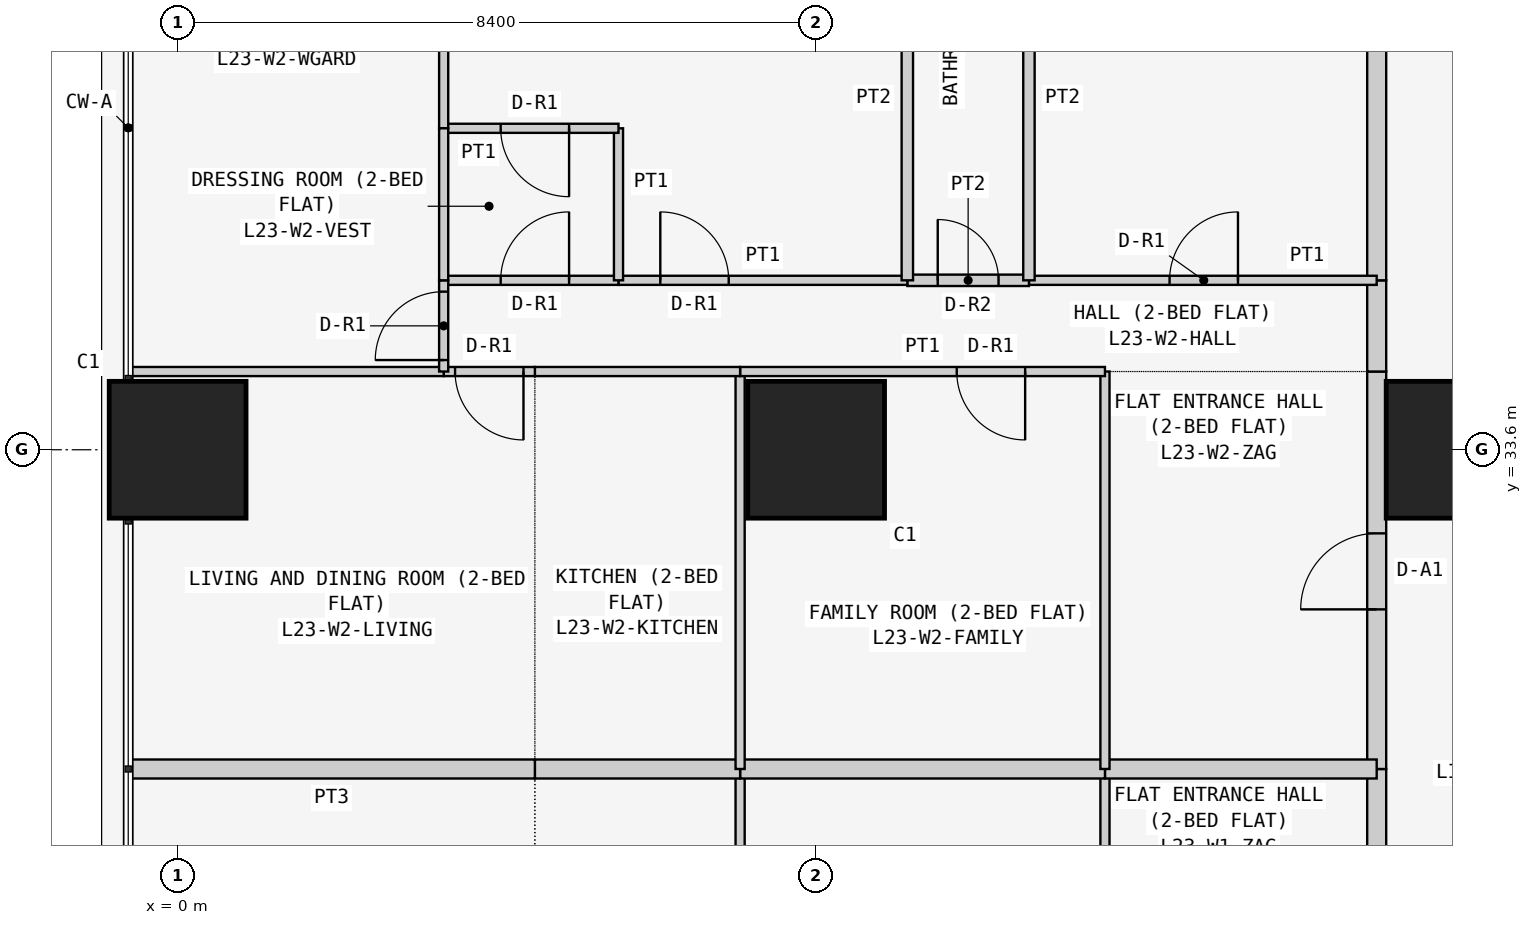
"""IFC4 building model, lengths in metres.
Left out: names, types, materials, properties, quantities, classifications, styles, units other than length and angle.
Written with IfcOpenShell. Run it as: python <this file> out.ifc"""

import sys

from ifc_helpers import new_model, si_unit, direction, frame, frame_2d, origin, origin_2d, place, context, subcontext, project, spatial, rectangle, extrude, element, fill, save


model = new_model("IFC4")
c1 = context("Model", 3, precision=1e-05, world=origin(), true_north=direction((0.0, 1.0)))
c2 = subcontext(c1, "Body", "Model", "MODEL_VIEW")
j1 = project(units=[si_unit("LENGTHUNIT", "METRE"), si_unit("PLANEANGLEUNIT", "RADIAN")], contexts=[c1])
p1 = place(None, origin())
s1 = spatial("IfcSite", under=j1, at=p1, CompositionType="ELEMENT")
p2 = place(p1, origin())
s2 = spatial("IfcBuilding", under=s1, at=p2, CompositionType="ELEMENT")
p3 = place(p2, frame((0.0, 0.0, 92.1)))
s3 = spatial("IfcBuildingStorey", under=s2, at=p3, CompositionType="ELEMENT", Elevation=92.1)
for number, where, z_axis, x_axis in (
    (1, (0.0, 33.6, 0.0), (0.0, 0.0, 1.0), (1.0, 0.0, 0.0)),
    (2, (8.4, 33.6, 0.0), (0.0, 0.0, 1.0), (1.0, 0.0, 0.0)),
    (3, (16.8, 33.6, 0.0), (0.0, 0.0, 1.0), (1.0, 0.0, 0.0)),
):
    element("IfcColumn", number, at=place(p3, frame(where, z_axis=z_axis, x_axis=x_axis)), inside=s3, PredefinedType="COLUMN", context=c2, shape_type="SweptSolid", body=[
        extrude(rectangle(XDim=1.8, YDim=1.8, at=origin_2d()), origin(), (0.0, 0.0, 1.0), 3.6),
    ])
p4 = place(p3, frame((15.775, 24.171, 0.0), z_axis=(0.0, 0.0, 1.0), x_axis=(0.0, 1.0, 0.0)))
e4 = element("IfcWall", 4, at=p4, inside=s3, PredefinedType="PARTITIONING", context=c2, shape_type="SweptSolid", body=[
    extrude(rectangle(XDim=5.229, YDim=0.25, at=frame_2d((2.615, 0.0))), origin(), (0.0, 0.0, 1.0), 3.45),
])
p5 = place(p4, frame((2.129, 0.0, 0.0)))
e5 = element("IfcOpeningElement", 5, at=p5, cuts=e4, PredefinedType="OPENING", context=c2, shape_type="SweptSolid", body=[
    extrude(rectangle(XDim=1.0, YDim=2.1, at=frame_2d((0.5, 1.05))), frame((0.0, 0.135, 0.0), z_axis=(0.0, -1.0, 0.0), x_axis=(1.0, 0.0, 0.0)), (0.0, 0.0, 1.0), 0.27),
])
p6 = place(p3, frame((15.775, 29.4, 0.0), z_axis=(0.0, 0.0, 1.0), x_axis=(0.0, 1.0, 0.0)))
e6 = element("IfcWall", 6, at=p6, inside=s3, PredefinedType="PARTITIONING", context=c2, shape_type="SweptSolid", body=[
    extrude(rectangle(XDim=5.229, YDim=0.25, at=frame_2d((2.615, 0.0))), origin(), (0.0, 0.0, 1.0), 3.45),
])
p7 = place(p6, frame((2.1, 0.0, 0.0)))
e7 = element("IfcOpeningElement", 7, at=p7, cuts=e6, PredefinedType="OPENING", context=c2, shape_type="SweptSolid", body=[
    extrude(rectangle(XDim=1.0, YDim=2.1, at=frame_2d((0.5, 1.05))), frame((0.0, 0.135, 0.0), z_axis=(0.0, -1.0, 0.0), x_axis=(1.0, 0.0, 0.0)), (0.0, 0.0, 1.0), 0.27),
])
p8 = place(p3, frame((15.775, 34.629, 0.0), z_axis=(0.0, 0.0, 1.0), x_axis=(0.0, 1.0, 0.0)))
e8 = element("IfcWall", 8, at=p8, inside=s3, PredefinedType="PARTITIONING", context=c2, shape_type="SweptSolid", body=[
    extrude(rectangle(XDim=1.2, YDim=0.25, at=frame_2d((0.6, 0.0))), origin(), (0.0, 0.0, 1.0), 3.45),
])
p9 = place(p3, frame((15.775, 35.829, 0.0), z_axis=(0.0, 0.0, 1.0), x_axis=(0.0, 1.0, 0.0)))
e9 = element("IfcWall", 9, at=p9, inside=s3, PredefinedType="PARTITIONING", context=c2, shape_type="SweptSolid", body=[
    extrude(rectangle(XDim=6.871, YDim=0.25, at=frame_2d((3.436, 0.0))), origin(), (0.0, 0.0, 1.0), 3.45),
])
p10 = place(p3, frame((12.2, 29.4, 0.0), z_axis=(0.0, 0.0, 1.0), x_axis=(0.0, -1.0, 0.0)))
e10 = element("IfcWall", 10, at=p10, inside=s3, PredefinedType="PARTITIONING", context=c2, shape_type="SweptSolid", body=[
    extrude(rectangle(XDim=5.229, YDim=0.12, at=frame_2d((2.615, 0.0))), origin(), (0.0, 0.0, 1.0), 3.45),
])
p11 = place(p3, frame((15.775, 29.4, 0.0), z_axis=(0.0, 0.0, 1.0), x_axis=(-1.0, 0.0, 0.0)))
e11 = element("IfcWall", 11, at=p11, inside=s3, PredefinedType="PARTITIONING", context=c2, shape_type="SweptSolid", body=[
    extrude(rectangle(XDim=3.575, YDim=0.25, at=frame_2d((1.788, 0.0))), origin(), (0.0, 0.0, 1.0), 3.45),
])
p12 = place(p3, frame((7.4, 29.4, 0.0), z_axis=(0.0, 0.0, 1.0), x_axis=(0.0, -1.0, 0.0)))
e12 = element("IfcWall", 12, at=p12, inside=s3, PredefinedType="PARTITIONING", context=c2, shape_type="SweptSolid", body=[
    extrude(rectangle(XDim=5.229, YDim=0.12, at=frame_2d((2.615, 0.0))), origin(), (0.0, 0.0, 1.0), 3.45),
])
p13 = place(p3, frame((12.2, 29.4, 0.0), z_axis=(0.0, 0.0, 1.0), x_axis=(-1.0, 0.0, 0.0)))
e13 = element("IfcWall", 13, at=p13, inside=s3, PredefinedType="PARTITIONING", context=c2, shape_type="SweptSolid", body=[
    extrude(rectangle(XDim=4.8, YDim=0.25, at=frame_2d((2.4, 0.0))), origin(), (0.0, 0.0, 1.0), 3.45),
])
p14 = place(p3, frame((7.4, 29.4, 0.0), z_axis=(0.0, 0.0, 1.0), x_axis=(-1.0, 0.0, 0.0)))
e14 = element("IfcWall", 14, at=p14, inside=s3, PredefinedType="PARTITIONING", context=c2, shape_type="SweptSolid", body=[
    extrude(rectangle(XDim=2.7, YDim=0.25, at=frame_2d((1.35, 0.0))), origin(), (0.0, 0.0, 1.0), 3.45),
])
p15 = place(p3, frame((4.7, 29.4, 0.0), z_axis=(0.0, 0.0, 1.0), x_axis=(-1.0, 0.0, 0.0)))
e15 = element("IfcWall", 15, at=p15, inside=s3, PredefinedType="PARTITIONING", context=c2, shape_type="SweptSolid", body=[
    extrude(rectangle(XDim=5.35, YDim=0.25, at=frame_2d((2.675, 0.0))), origin(), (0.0, 0.0, 1.0), 3.45),
])
for number, where, z_axis, x_axis in (
    (16, (12.2, 29.4, 0.0), (0.0, 0.0, 1.0), (0.0, 1.0, 0.0)),
    (17, (7.4, 29.4, 0.0), (0.0, 0.0, 1.0), (0.0, 1.0, 0.0)),
):
    element("IfcWall", number, at=place(p3, frame(where, z_axis=z_axis, x_axis=x_axis)), inside=s3, PredefinedType="PARTITIONING", context=c2, shape_type="SweptSolid", body=[
        extrude(rectangle(XDim=5.229, YDim=0.12, at=frame_2d((2.615, 0.0))), origin(), (0.0, 0.0, 1.0), 3.45),
    ])
p16 = place(p3, frame((7.4, 34.629, 0.0), z_axis=(0.0, 0.0, 1.0), x_axis=(1.0, 0.0, 0.0)))
e18 = element("IfcWall", 18, at=p16, inside=s3, PredefinedType="PARTITIONING", context=c2, shape_type="SweptSolid", body=[
    extrude(rectangle(XDim=4.8, YDim=0.12, at=frame_2d((2.4, 0.0))), origin(), (0.0, 0.0, 1.0), 3.45),
])
p17 = place(p16, frame((2.85, 0.0, 0.0)))
e19 = element("IfcOpeningElement", 19, at=p17, cuts=e18, PredefinedType="OPENING", context=c2, shape_type="SweptSolid", body=[
    extrude(rectangle(XDim=0.9, YDim=2.1, at=frame_2d((0.45, 1.05))), frame((0.0, 0.07, 0.0), z_axis=(0.0, -1.0, 0.0), x_axis=(1.0, 0.0, 0.0)), (0.0, 0.0, 1.0), 0.14),
])
p18 = place(p3, frame((4.7, 34.629, 0.0), z_axis=(0.0, 0.0, 1.0), x_axis=(1.0, 0.0, 0.0)))
e20 = element("IfcWall", 20, at=p18, inside=s3, PredefinedType="PARTITIONING", context=c2, shape_type="SweptSolid", body=[
    extrude(rectangle(XDim=2.7, YDim=0.12, at=frame_2d((1.35, 0.0))), origin(), (0.0, 0.0, 1.0), 3.45),
])
p19 = place(p3, frame((3.5, 34.629, 0.0), z_axis=(0.0, 0.0, 1.0), x_axis=(1.0, 0.0, 0.0)))
e21 = element("IfcWall", 21, at=p19, inside=s3, PredefinedType="PARTITIONING", context=c2, shape_type="SweptSolid", body=[
    extrude(rectangle(XDim=1.2, YDim=0.12, at=frame_2d((0.6, 0.0))), origin(), (0.0, 0.0, 1.0), 3.45),
])
p20 = place(p19, frame((0.15, 0.0, 0.0)))
e22 = element("IfcOpeningElement", 22, at=p20, cuts=e21, PredefinedType="OPENING", context=c2, shape_type="SweptSolid", body=[
    extrude(rectangle(XDim=0.9, YDim=2.1, at=frame_2d((0.45, 1.05))), frame((0.0, 0.07, 0.0), z_axis=(0.0, -1.0, 0.0), x_axis=(1.0, 0.0, 0.0)), (0.0, 0.0, 1.0), 0.14),
])
p21 = place(p3, frame((-0.65, 34.629, 0.0), z_axis=(0.0, 0.0, 1.0), x_axis=(1.0, 0.0, 0.0)))
e23 = element("IfcWall", 23, at=p21, inside=s3, PredefinedType="PARTITIONING", context=c2, shape_type="SweptSolid", body=[
    extrude(rectangle(XDim=4.15, YDim=0.12, at=frame_2d((2.075, 0.0))), origin(), (0.0, 0.0, 1.0), 3.45),
])
p22 = place(p3, frame((11.2, 35.829, 0.0), z_axis=(0.0, 0.0, 1.0), x_axis=(1.0, 0.0, 0.0)))
e24 = element("IfcWall", 24, at=p22, inside=s3, PredefinedType="PARTITIONING", context=c2, shape_type="SweptSolid", body=[
    extrude(rectangle(XDim=4.575, YDim=0.12, at=frame_2d((2.288, 0.0))), origin(), (0.0, 0.0, 1.0), 3.45),
])
p23 = place(p22, frame((1.85, 0.0, 0.0)))
e25 = element("IfcOpeningElement", 25, at=p23, cuts=e24, PredefinedType="OPENING", context=c2, shape_type="SweptSolid", body=[
    extrude(rectangle(XDim=0.9, YDim=2.1, at=frame_2d((0.45, 1.05))), frame((0.0, 0.07, 0.0), z_axis=(0.0, -1.0, 0.0), x_axis=(1.0, 0.0, 0.0)), (0.0, 0.0, 1.0), 0.14),
])
p24 = place(p3, frame((9.6, 35.829, 0.0), z_axis=(0.0, 0.0, 1.0), x_axis=(1.0, 0.0, 0.0)))
e26 = element("IfcWall", 26, at=p24, inside=s3, PredefinedType="PARTITIONING", context=c2, shape_type="SweptSolid", body=[
    extrude(rectangle(XDim=1.6, YDim=0.15, at=frame_2d((0.8, 0.0))), origin(), (0.0, 0.0, 1.0), 3.45),
])
p25 = place(p24, frame((0.4, 0.0, 0.0)))
e27 = element("IfcOpeningElement", 27, at=p25, cuts=e26, PredefinedType="OPENING", context=c2, shape_type="SweptSolid", body=[
    extrude(rectangle(XDim=0.8, YDim=2.1, at=frame_2d((0.4, 1.05))), frame((0.0, 0.085, 0.0), z_axis=(0.0, -1.0, 0.0), x_axis=(1.0, 0.0, 0.0)), (0.0, 0.0, 1.0), 0.17),
])
p26 = place(p3, frame((5.8, 35.829, 0.0), z_axis=(0.0, 0.0, 1.0), x_axis=(1.0, 0.0, 0.0)))
e28 = element("IfcWall", 28, at=p26, inside=s3, PredefinedType="PARTITIONING", context=c2, shape_type="SweptSolid", body=[
    extrude(rectangle(XDim=3.8, YDim=0.12, at=frame_2d((1.9, 0.0))), origin(), (0.0, 0.0, 1.0), 3.45),
])
p27 = place(p26, frame((0.55, 0.0, 0.0)))
e29 = element("IfcOpeningElement", 29, at=p27, cuts=e28, PredefinedType="OPENING", context=c2, shape_type="SweptSolid", body=[
    extrude(rectangle(XDim=0.9, YDim=2.1, at=frame_2d((0.45, 1.05))), frame((0.0, 0.07, 0.0), z_axis=(0.0, -1.0, 0.0), x_axis=(1.0, 0.0, 0.0)), (0.0, 0.0, 1.0), 0.14),
])
p28 = place(p3, frame((3.5, 35.829, 0.0), z_axis=(0.0, 0.0, 1.0), x_axis=(1.0, 0.0, 0.0)))
e30 = element("IfcWall", 30, at=p28, inside=s3, PredefinedType="PARTITIONING", context=c2, shape_type="SweptSolid", body=[
    extrude(rectangle(XDim=2.3, YDim=0.12, at=frame_2d((1.15, 0.0))), origin(), (0.0, 0.0, 1.0), 3.45),
])
p29 = place(p28, frame((0.75, 0.0, 0.0)))
e31 = element("IfcOpeningElement", 31, at=p29, cuts=e30, PredefinedType="OPENING", context=c2, shape_type="SweptSolid", body=[
    extrude(rectangle(XDim=0.9, YDim=2.1, at=frame_2d((0.45, 1.05))), frame((0.0, 0.07, 0.0), z_axis=(0.0, -1.0, 0.0), x_axis=(1.0, 0.0, 0.0)), (0.0, 0.0, 1.0), 0.14),
])
p30 = place(p3, frame((3.5, 34.629, 0.0), z_axis=(0.0, 0.0, 1.0), x_axis=(0.0, 1.0, 0.0)))
e32 = element("IfcWall", 32, at=p30, inside=s3, PredefinedType="PARTITIONING", context=c2, shape_type="SweptSolid", body=[
    extrude(rectangle(XDim=1.2, YDim=0.12, at=frame_2d((0.6, 0.0))), origin(), (0.0, 0.0, 1.0), 3.45),
])
p31 = place(p30, frame((0.151, 0.0, 0.0)))
e33 = element("IfcOpeningElement", 33, at=p31, cuts=e32, PredefinedType="OPENING", context=c2, shape_type="SweptSolid", body=[
    extrude(rectangle(XDim=0.9, YDim=2.1, at=frame_2d((0.45, 1.05))), frame((0.0, 0.07, 0.0), z_axis=(0.0, -1.0, 0.0), x_axis=(1.0, 0.0, 0.0)), (0.0, 0.0, 1.0), 0.14),
])
for number, where, z_axis, x_axis in (
    (34, (11.2, 35.829, 0.0), (0.0, 0.0, 1.0), (0.0, 1.0, 0.0)),
    (35, (9.6, 35.829, 0.0), (0.0, 0.0, 1.0), (0.0, 1.0, 0.0)),
):
    element("IfcWall", number, at=place(p3, frame(where, z_axis=z_axis, x_axis=x_axis)), inside=s3, PredefinedType="PARTITIONING", context=c2, shape_type="SweptSolid", body=[
        extrude(rectangle(XDim=6.871, YDim=0.15, at=frame_2d((3.436, 0.0))), origin(), (0.0, 0.0, 1.0), 3.45),
    ])
p32 = place(p3, frame((5.8, 35.829, 0.0), z_axis=(0.0, 0.0, 1.0), x_axis=(0.0, 1.0, 0.0)))
e36 = element("IfcWall", 36, at=p32, inside=s3, PredefinedType="PARTITIONING", context=c2, shape_type="SweptSolid", body=[
    extrude(rectangle(XDim=2.0, YDim=0.12, at=frame_2d((1.0, 0.0))), origin(), (0.0, 0.0, 1.0), 3.45),
])
p33 = place(p3, frame((5.8, 37.829, 0.0), z_axis=(0.0, 0.0, 1.0), x_axis=(-1.0, 0.0, 0.0)))
e37 = element("IfcWall", 37, at=p33, inside=s3, PredefinedType="PARTITIONING", context=c2, shape_type="SweptSolid", body=[
    extrude(rectangle(XDim=2.3, YDim=0.12, at=frame_2d((1.15, 0.0))), origin(), (0.0, 0.0, 1.0), 3.45),
])
p34 = place(p33, frame((0.65, 0.0, 0.0)))
e38 = element("IfcOpeningElement", 38, at=p34, cuts=e37, PredefinedType="OPENING", context=c2, shape_type="SweptSolid", body=[
    extrude(rectangle(XDim=0.9, YDim=2.1, at=frame_2d((0.45, 1.05))), frame((0.0, 0.07, 0.0), z_axis=(0.0, -1.0, 0.0), x_axis=(1.0, 0.0, 0.0)), (0.0, 0.0, 1.0), 0.14),
])
p35 = place(p3, frame((3.5, 37.829, 0.0), z_axis=(0.0, 0.0, 1.0), x_axis=(0.0, 1.0, 0.0)))
e39 = element("IfcWall", 39, at=p35, inside=s3, PredefinedType="PARTITIONING", context=c2, shape_type="SweptSolid", body=[
    extrude(rectangle(XDim=4.871, YDim=0.12, at=frame_2d((2.436, 0.0))), origin(), (0.0, 0.0, 1.0), 3.45),
])
p36 = place(p3, frame((3.5, 35.829, 0.0), z_axis=(0.0, 0.0, 1.0), x_axis=(0.0, 1.0, 0.0)))
e40 = element("IfcWall", 40, at=p36, inside=s3, PredefinedType="PARTITIONING", context=c2, shape_type="SweptSolid", body=[
    extrude(rectangle(XDim=2.0, YDim=0.12, at=frame_2d((1.0, 0.0))), origin(), (0.0, 0.0, 1.0), 3.45),
])
p37 = place(p7, origin())
e41 = element("IfcDoor", 41, at=p37, inside=s3, OperationType="SINGLE_SWING_LEFT", PredefinedType="DOOR", context=c2, shape_type="SweptSolid", body=[
    extrude(rectangle(XDim=1.0, YDim=2.1, at=frame_2d((0.5, 1.05))), frame((0.0, 0.025, 0.0), z_axis=(0.0, -1.0, 0.0), x_axis=(1.0, 0.0, 0.0)), (0.0, 0.0, 1.0), 0.05),
])
fill(e7, e41)
p38 = place(p17, frame((0.9, 0.0, 0.0), z_axis=(0.0, 0.0, 1.0), x_axis=(-1.0, 0.0, 0.0)))
e42 = element("IfcDoor", 42, at=p38, inside=s3, OperationType="SINGLE_SWING_LEFT", PredefinedType="DOOR", context=c2, shape_type="SweptSolid", body=[
    extrude(rectangle(XDim=0.9, YDim=2.1, at=frame_2d((0.45, 1.05))), frame((0.0, 0.025, 0.0), z_axis=(0.0, -1.0, 0.0), x_axis=(1.0, 0.0, 0.0)), (0.0, 0.0, 1.0), 0.05),
])
fill(e19, e42)
p39 = place(p20, frame((0.9, 0.0, 0.0), z_axis=(0.0, 0.0, 1.0), x_axis=(-1.0, 0.0, 0.0)))
e43 = element("IfcDoor", 43, at=p39, inside=s3, OperationType="SINGLE_SWING_LEFT", PredefinedType="DOOR", context=c2, shape_type="SweptSolid", body=[
    extrude(rectangle(XDim=0.9, YDim=2.1, at=frame_2d((0.45, 1.05))), frame((0.0, 0.025, 0.0), z_axis=(0.0, -1.0, 0.0), x_axis=(1.0, 0.0, 0.0)), (0.0, 0.0, 1.0), 0.05),
])
fill(e22, e43)
p40 = place(p23, origin())
e44 = element("IfcDoor", 44, at=p40, inside=s3, OperationType="SINGLE_SWING_RIGHT", PredefinedType="DOOR", context=c2, shape_type="SweptSolid", body=[
    extrude(rectangle(XDim=0.9, YDim=2.1, at=frame_2d((0.45, 1.05))), frame((0.0, 0.025, 0.0), z_axis=(0.0, -1.0, 0.0), x_axis=(1.0, 0.0, 0.0)), (0.0, 0.0, 1.0), 0.05),
])
fill(e25, e44)
p41 = place(p25, origin())
e45 = element("IfcDoor", 45, at=p41, inside=s3, OperationType="SINGLE_SWING_LEFT", PredefinedType="DOOR", context=c2, shape_type="SweptSolid", body=[
    extrude(rectangle(XDim=0.8, YDim=2.1, at=frame_2d((0.4, 1.05))), frame((0.0, 0.025, 0.0), z_axis=(0.0, -1.0, 0.0), x_axis=(1.0, 0.0, 0.0)), (0.0, 0.0, 1.0), 0.05),
])
fill(e27, e45)
p42 = place(p27, origin())
e46 = element("IfcDoor", 46, at=p42, inside=s3, OperationType="SINGLE_SWING_LEFT", PredefinedType="DOOR", context=c2, shape_type="SweptSolid", body=[
    extrude(rectangle(XDim=0.9, YDim=2.1, at=frame_2d((0.45, 1.05))), frame((0.0, 0.025, 0.0), z_axis=(0.0, -1.0, 0.0), x_axis=(1.0, 0.0, 0.0)), (0.0, 0.0, 1.0), 0.05),
])
fill(e29, e46)
p43 = place(p29, origin())
e47 = element("IfcDoor", 47, at=p43, inside=s3, OperationType="SINGLE_SWING_RIGHT", PredefinedType="DOOR", context=c2, shape_type="SweptSolid", body=[
    extrude(rectangle(XDim=0.9, YDim=2.1, at=frame_2d((0.45, 1.05))), frame((0.0, 0.025, 0.0), z_axis=(0.0, -1.0, 0.0), x_axis=(1.0, 0.0, 0.0)), (0.0, 0.0, 1.0), 0.05),
])
fill(e31, e47)
p44 = place(p34, origin())
e48 = element("IfcDoor", 48, at=p44, inside=s3, OperationType="SINGLE_SWING_LEFT", PredefinedType="DOOR", context=c2, shape_type="SweptSolid", body=[
    extrude(rectangle(XDim=0.9, YDim=2.1, at=frame_2d((0.45, 1.05))), frame((0.0, 0.025, 0.0), z_axis=(0.0, -1.0, 0.0), x_axis=(1.0, 0.0, 0.0)), (0.0, 0.0, 1.0), 0.05),
])
fill(e38, e48)
p45 = place(p31, origin())
e49 = element("IfcDoor", 49, at=p45, inside=s3, OperationType="SINGLE_SWING_LEFT", PredefinedType="DOOR", context=c2, shape_type="SweptSolid", body=[
    extrude(rectangle(XDim=0.9, YDim=2.1, at=frame_2d((0.45, 1.05))), frame((0.0, 0.025, 0.0), z_axis=(0.0, -1.0, 0.0), x_axis=(1.0, 0.0, 0.0)), (0.0, 0.0, 1.0), 0.05),
])
fill(e33, e49)
save(model, sys.argv[1])
